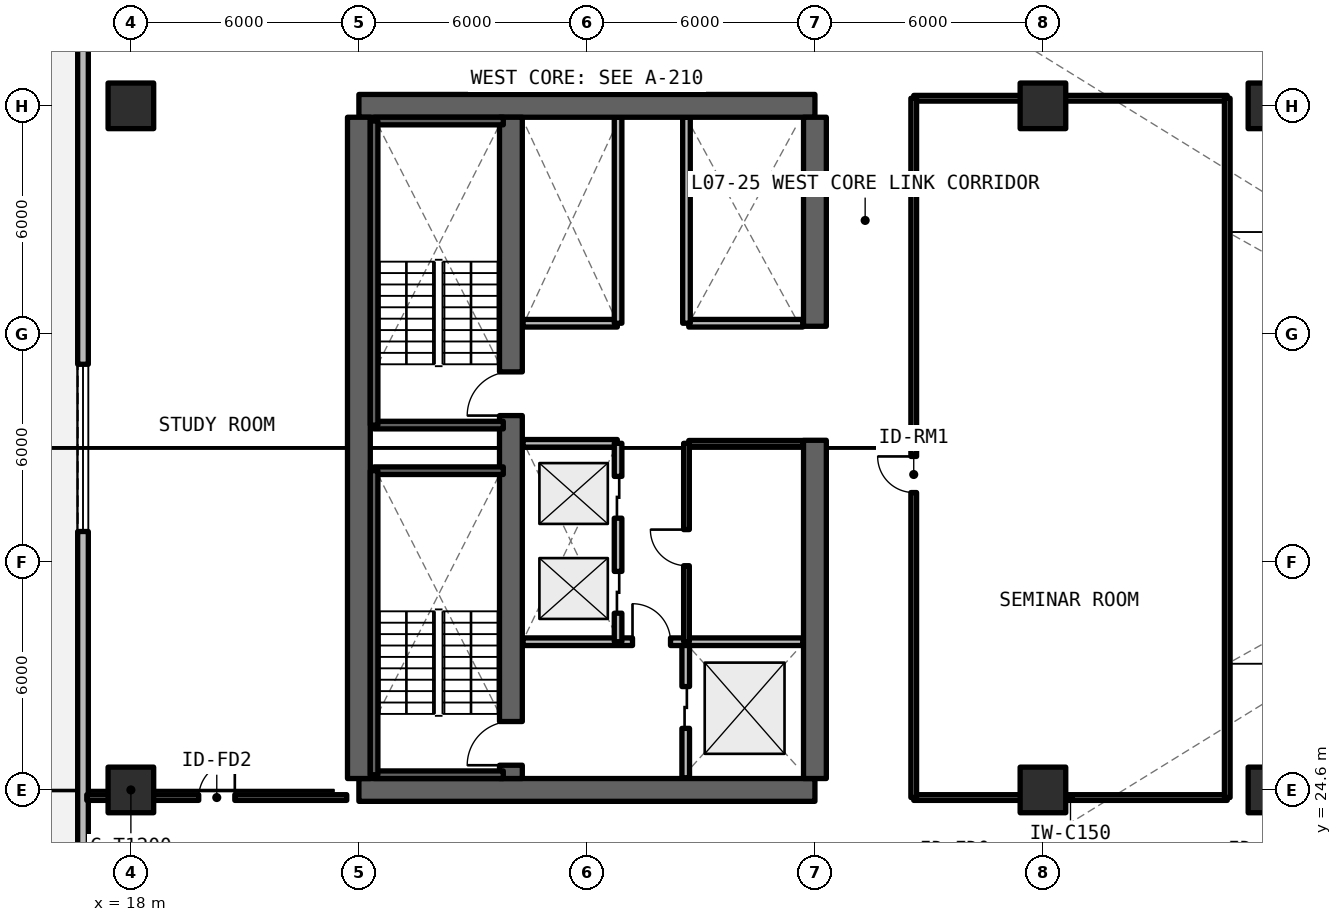
"""IFC4 building model, lengths in metres.
Left out: names, types, materials, properties, quantities, classifications, styles, units other than length and angle.
Written with IfcOpenShell. Run it as: python <this file> out.ifc"""

import sys

from ifc_helpers import new_model, si_unit, direction, frame, frame_2d, origin, origin_2d, place, context, subcontext, project, spatial, rectangle, extrude, element, fill, save


model = new_model("IFC4")
c1 = context("Model", 3, precision=1e-05, world=origin(), true_north=direction((0.0, 1.0)))
c2 = subcontext(c1, "Body", "Model", "MODEL_VIEW")
j1 = project(units=[si_unit("LENGTHUNIT", "METRE"), si_unit("PLANEANGLEUNIT", "RADIAN")], contexts=[c1])
p1 = place(None, origin())
s1 = spatial("IfcSite", under=j1, at=p1, CompositionType="ELEMENT")
p2 = place(p1, origin())
s2 = spatial("IfcBuilding", under=s1, at=p2, CompositionType="ELEMENT")
p3 = place(p2, frame((0.0, 0.0, 29.04)))
s3 = spatial("IfcBuildingStorey", under=s2, at=p3, CompositionType="ELEMENT", Elevation=29.04)
for number, where, z_axis, x_axis in (
    (1, (24.0, 24.6, 0.0), (0.0, 0.0, 1.0), (1.0, 0.0, 0.0)),
    (2, (36.0, 42.6, 0.0), (0.0, 0.0, 1.0), (-1.0, 0.0, 0.0)),
):
    element("IfcWall", number, at=place(p3, frame(where, z_axis=z_axis, x_axis=x_axis)), inside=s3, PredefinedType="SHEAR", context=c2, shape_type="SweptSolid", body=[
        extrude(rectangle(XDim=12.0, YDim=0.6, at=frame_2d((6.0, 0.0))), origin(), (0.0, 0.0, 1.0), 3.3),
    ])
p4 = place(p3, frame((24.0, 24.9, 0.0), z_axis=(0.0, 0.0, 1.0), x_axis=(0.0, 1.0, 0.0)))
e3 = element("IfcWall", 3, at=p4, inside=s3, PredefinedType="SHEAR", context=c2, shape_type="SweptSolid", body=[
    extrude(rectangle(XDim=17.4, YDim=0.6, at=frame_2d((8.7, 0.0))), origin(), (0.0, 0.0, 1.0), 3.3),
])
p5 = place(p3, frame((36.0, 24.9, 0.0), z_axis=(0.0, 0.0, 1.0), x_axis=(0.0, 1.0, 0.0)))
e4 = element("IfcWall", 4, at=p5, inside=s3, PredefinedType="SHEAR", context=c2, shape_type="SweptSolid", body=[
    extrude(rectangle(XDim=8.9, YDim=0.6, at=frame_2d((4.45, 0.0))), origin(), (0.0, 0.0, 1.0), 3.3),
])
p6 = place(p3, frame((36.0, 36.8, 0.0), z_axis=(0.0, 0.0, 1.0), x_axis=(0.0, 1.0, 0.0)))
e5 = element("IfcWall", 5, at=p6, inside=s3, PredefinedType="SHEAR", context=c2, shape_type="SweptSolid", body=[
    extrude(rectangle(XDim=5.5, YDim=0.6, at=frame_2d((2.75, 0.0))), origin(), (0.0, 0.0, 1.0), 3.3),
])
p7 = place(p3, frame((28.0, 24.9, 0.0), z_axis=(0.0, 0.0, 1.0), x_axis=(0.0, 1.0, 0.0)))
e6 = element("IfcWall", 6, at=p7, inside=s3, PredefinedType="SHEAR", context=c2, shape_type="SweptSolid", body=[
    extrude(rectangle(XDim=17.4, YDim=0.6, at=frame_2d((8.7, 0.0))), origin(), (0.0, 0.0, 1.0), 3.3),
])
p8 = place(p7, frame((0.35, 0.0, 0.0)))
e7 = element("IfcOpeningElement", 7, at=p8, cuts=e6, PredefinedType="OPENING", context=c2, shape_type="SweptSolid", body=[
    extrude(rectangle(XDim=1.15, YDim=2.15, at=frame_2d((0.575, 1.075))), frame((0.0, 0.31, 0.0), z_axis=(0.0, -1.0, 0.0), x_axis=(1.0, 0.0, 0.0)), (0.0, 0.0, 1.0), 0.62),
])
p9 = place(p7, frame((9.55, 0.0, 0.0)))
e8 = element("IfcOpeningElement", 8, at=p9, cuts=e6, PredefinedType="OPENING", context=c2, shape_type="SweptSolid", body=[
    extrude(rectangle(XDim=1.15, YDim=2.15, at=frame_2d((0.575, 1.075))), frame((0.0, 0.31, 0.0), z_axis=(0.0, -1.0, 0.0), x_axis=(1.0, 0.0, 0.0)), (0.0, 0.0, 1.0), 0.62),
])
for number, where, z_axis, x_axis in (
    (9, (18.0, 24.6, -0.24), (0.0, 0.0, 1.0), (1.0, 0.0, 0.0)),
    (10, (18.0, 42.6, -0.24), (0.0, 0.0, 1.0), (1.0, 0.0, 0.0)),
    (11, (42.0, 24.6, -0.24), (0.0, 0.0, 1.0), (1.0, 0.0, 0.0)),
    (12, (42.0, 42.6, -0.24), (0.0, 0.0, 1.0), (1.0, 0.0, 0.0)),
    (13, (48.0, 24.6, -0.24), (0.0, 0.0, 1.0), (1.0, 0.0, 0.0)),
    (14, (48.0, 42.6, -0.24), (0.0, 0.0, 1.0), (1.0, 0.0, 0.0)),
):
    element("IfcColumn", number, at=place(p3, frame(where, z_axis=z_axis, x_axis=x_axis)), inside=s3, PredefinedType="COLUMN", context=c2, shape_type="SweptSolid", body=[
        extrude(rectangle(XDim=1.2, YDim=1.2, at=origin_2d()), origin(), (0.0, 0.0, 1.0), 3.54),
    ])
p10 = place(p3, frame((16.74, 55.342, 0.0), z_axis=(0.0, 0.0, 1.0), x_axis=(0.0, -1.0, 0.0)))
e15 = element("IfcWall", 15, at=p10, inside=s3, PredefinedType="SOLIDWALL", context=c2, shape_type="SweptSolid", body=[
    extrude(rectangle(XDim=43.484, YDim=0.28, at=frame_2d((21.742, 0.0))), origin(), (0.0, 0.0, 1.0), 3.08),
])
p11 = place(p10, frame((19.542, 0.0, 0.78)))
e16 = element("IfcOpeningElement", 16, at=p11, cuts=e15, PredefinedType="OPENING", context=c2, shape_type="SweptSolid", body=[
    extrude(rectangle(XDim=4.4, YDim=1.66, at=frame_2d((2.2, 0.83))), frame((0.0, 0.15, 0.0), z_axis=(0.0, -1.0, 0.0), x_axis=(1.0, 0.0, 0.0)), (0.0, 0.0, 1.0), 0.3),
])
p12 = place(p10, frame((37.573, 0.0, 0.78)))
e17 = element("IfcOpeningElement", 17, at=p12, cuts=e15, PredefinedType="OPENING", context=c2, shape_type="SweptSolid", body=[
    extrude(rectangle(XDim=4.4, YDim=1.66, at=frame_2d((2.2, 0.83))), frame((0.0, 0.15, 0.0), z_axis=(0.0, -1.0, 0.0), x_axis=(1.0, 0.0, 0.0)), (0.0, 0.0, 1.0), 0.3),
])
p13 = place(p3, frame((32.6, 24.92, 0.0), z_axis=(0.0, 0.0, 1.0), x_axis=(0.0, 1.0, 0.0)))
e18 = element("IfcWall", 18, at=p13, inside=s3, PredefinedType="SOLIDWALL", context=c2, shape_type="SweptSolid", body=[
    extrude(rectangle(XDim=3.58, YDim=0.2, at=frame_2d((1.79, 0.0))), origin(), (0.0, 0.0, 1.0), 2.35),
])
p14 = place(p13, frame((1.3, 0.0, 0.0)))
e19 = element("IfcOpeningElement", 19, at=p14, cuts=e18, PredefinedType="OPENING", context=c2, shape_type="SweptSolid", body=[
    extrude(rectangle(XDim=1.1, YDim=2.2, at=frame_2d((0.55, 1.1))), frame((0.0, 0.11, 0.0), z_axis=(0.0, -1.0, 0.0), x_axis=(1.0, 0.0, 0.0)), (0.0, 0.0, 1.0), 0.22),
])
p15 = place(p3, frame((28.32, 28.5, 0.0), z_axis=(0.0, 0.0, 1.0), x_axis=(1.0, 0.0, 0.0)))
e20 = element("IfcWall", 20, at=p15, inside=s3, PredefinedType="SOLIDWALL", context=c2, shape_type="SweptSolid", body=[
    extrude(rectangle(XDim=7.36, YDim=0.2, at=frame_2d((3.68, 0.0))), origin(), (0.0, 0.0, 1.0), 2.35),
])
p16 = place(p15, frame((2.88, 0.0, 0.0)))
e21 = element("IfcOpeningElement", 21, at=p16, cuts=e20, PredefinedType="OPENING", context=c2, shape_type="SweptSolid", body=[
    extrude(rectangle(XDim=1.0, YDim=2.15, at=frame_2d((0.5, 1.075))), frame((0.0, 0.11, 0.0), z_axis=(0.0, -1.0, 0.0), x_axis=(1.0, 0.0, 0.0)), (0.0, 0.0, 1.0), 0.22),
])
p17 = place(p3, frame((28.32, 33.72, 0.0), z_axis=(0.0, 0.0, 1.0), x_axis=(1.0, 0.0, 0.0)))
e22 = element("IfcWall", 22, at=p17, inside=s3, PredefinedType="SOLIDWALL", context=c2, shape_type="SweptSolid", body=[
    extrude(rectangle(XDim=2.48, YDim=0.2, at=frame_2d((1.24, 0.0))), origin(), (0.0, 0.0, 1.0), 2.35),
])
p18 = place(p3, frame((30.82, 28.5, 0.0), z_axis=(0.0, 0.0, 1.0), x_axis=(0.0, 1.0, 0.0)))
e23 = element("IfcWall", 23, at=p18, inside=s3, PredefinedType="SOLIDWALL", context=c2, shape_type="SweptSolid", body=[
    extrude(rectangle(XDim=5.22, YDim=0.2, at=frame_2d((2.61, 0.0))), origin(), (0.0, 0.0, 1.0), 2.35),
])
p19 = place(p18, frame((0.75, 0.0, 0.0)))
e24 = element("IfcOpeningElement", 24, at=p19, cuts=e23, PredefinedType="OPENING", context=c2, shape_type="SweptSolid", body=[
    extrude(rectangle(XDim=1.1, YDim=2.2, at=frame_2d((0.55, 1.1))), frame((0.0, 0.11, 0.0), z_axis=(0.0, -1.0, 0.0), x_axis=(1.0, 0.0, 0.0)), (0.0, 0.0, 1.0), 0.22),
])
p20 = place(p18, frame((3.25, 0.0, 0.0)))
e25 = element("IfcOpeningElement", 25, at=p20, cuts=e23, PredefinedType="OPENING", context=c2, shape_type="SweptSolid", body=[
    extrude(rectangle(XDim=1.1, YDim=2.2, at=frame_2d((0.55, 1.1))), frame((0.0, 0.11, 0.0), z_axis=(0.0, -1.0, 0.0), x_axis=(1.0, 0.0, 0.0)), (0.0, 0.0, 1.0), 0.22),
])
p21 = place(p3, frame((32.68, 33.72, 0.0), z_axis=(0.0, 0.0, 1.0), x_axis=(1.0, 0.0, 0.0)))
e26 = element("IfcWall", 26, at=p21, inside=s3, PredefinedType="SOLIDWALL", context=c2, shape_type="SweptSolid", body=[
    extrude(rectangle(XDim=3.0, YDim=0.15, at=frame_2d((1.5, 0.0))), origin(), (0.0, 0.0, 1.0), 2.35),
])
p22 = place(p3, frame((32.62, 28.5, 0.0), z_axis=(0.0, 0.0, 1.0), x_axis=(0.0, 1.0, 0.0)))
e27 = element("IfcWall", 27, at=p22, inside=s3, PredefinedType="SOLIDWALL", context=c2, shape_type="SweptSolid", body=[
    extrude(rectangle(XDim=5.22, YDim=0.15, at=frame_2d((2.61, 0.0))), origin(), (0.0, 0.0, 1.0), 2.35),
])
p23 = place(p22, frame((2.0, 0.0, 0.0)))
e28 = element("IfcOpeningElement", 28, at=p23, cuts=e27, PredefinedType="OPENING", context=c2, shape_type="SweptSolid", body=[
    extrude(rectangle(XDim=0.95, YDim=2.15, at=frame_2d((0.475, 1.075))), frame((0.0, 0.085, 0.0), z_axis=(0.0, -1.0, 0.0), x_axis=(1.0, 0.0, 0.0)), (0.0, 0.0, 1.0), 0.17),
])
p24 = place(p3, frame((28.32, 36.88, 0.0), z_axis=(0.0, 0.0, 1.0), x_axis=(1.0, 0.0, 0.0)))
e29 = element("IfcWall", 29, at=p24, inside=s3, PredefinedType="SOLIDWALL", context=c2, shape_type="SweptSolid", body=[
    extrude(rectangle(XDim=2.48, YDim=0.2, at=frame_2d((1.24, 0.0))), origin(), (0.0, 0.0, 1.0), 2.35),
])
p25 = place(p3, frame((30.82, 36.88, 0.0), z_axis=(0.0, 0.0, 1.0), x_axis=(0.0, 1.0, 0.0)))
e30 = element("IfcWall", 30, at=p25, inside=s3, PredefinedType="SOLIDWALL", context=c2, shape_type="SweptSolid", body=[
    extrude(rectangle(XDim=5.42, YDim=0.2, at=frame_2d((2.71, 0.0))), origin(), (0.0, 0.0, 1.0), 2.35),
])
p26 = place(p3, frame((32.68, 36.88, 0.0), z_axis=(0.0, 0.0, 1.0), x_axis=(1.0, 0.0, 0.0)))
e31 = element("IfcWall", 31, at=p26, inside=s3, PredefinedType="SOLIDWALL", context=c2, shape_type="SweptSolid", body=[
    extrude(rectangle(XDim=3.0, YDim=0.2, at=frame_2d((1.5, 0.0))), origin(), (0.0, 0.0, 1.0), 2.35),
])
p27 = place(p3, frame((32.62, 36.88, 0.0), z_axis=(0.0, 0.0, 1.0), x_axis=(0.0, 1.0, 0.0)))
e32 = element("IfcWall", 32, at=p27, inside=s3, PredefinedType="SOLIDWALL", context=c2, shape_type="SweptSolid", body=[
    extrude(rectangle(XDim=5.42, YDim=0.2, at=frame_2d((2.71, 0.0))), origin(), (0.0, 0.0, 1.0), 2.35),
])
for number, where, z_axis, x_axis in (
    (33, (38.6, 24.4, 0.0), (0.0, 0.0, 1.0), (1.0, 0.0, 0.0)),
    (34, (38.6, 42.8, 0.0), (0.0, 0.0, 1.0), (1.0, 0.0, 0.0)),
):
    element("IfcWall", number, at=place(p3, frame(where, z_axis=z_axis, x_axis=x_axis)), inside=s3, PredefinedType="SOLIDWALL", context=c2, shape_type="SweptSolid", body=[
        extrude(rectangle(XDim=8.25, YDim=0.15, at=frame_2d((4.125, 0.0))), origin(), (0.0, 0.0, 1.0), 2.295),
    ])
p28 = place(p3, frame((38.6, 24.4, 0.0), z_axis=(0.0, 0.0, 1.0), x_axis=(0.0, 1.0, 0.0)))
e35 = element("IfcWall", 35, at=p28, inside=s3, PredefinedType="SOLIDWALL", context=c2, shape_type="SweptSolid", body=[
    extrude(rectangle(XDim=18.4, YDim=0.15, at=frame_2d((9.2, 0.0))), origin(), (0.0, 0.0, 1.0), 2.35),
])
p29 = place(p28, frame((8.025, 0.0, 0.0)))
e36 = element("IfcOpeningElement", 36, at=p29, cuts=e35, PredefinedType="OPENING", context=c2, shape_type="SweptSolid", body=[
    extrude(rectangle(XDim=0.95, YDim=2.15, at=frame_2d((0.475, 1.075))), frame((0.0, 0.085, 0.0), z_axis=(0.0, -1.0, 0.0), x_axis=(1.0, 0.0, 0.0)), (0.0, 0.0, 1.0), 0.17),
])
p30 = place(p3, frame((46.85, 24.4, 0.0), z_axis=(0.0, 0.0, 1.0), x_axis=(0.0, 1.0, 0.0)))
e37 = element("IfcWall", 37, at=p30, inside=s3, PredefinedType="SOLIDWALL", context=c2, shape_type="SweptSolid", body=[
    extrude(rectangle(XDim=18.4, YDim=0.15, at=frame_2d((9.2, 0.0))), origin(), (0.0, 0.0, 1.0), 2.35),
])
p31 = place(p3, frame((16.84, 24.4, 0.0), z_axis=(0.0, 0.0, 1.0), x_axis=(1.0, 0.0, 0.0)))
e38 = element("IfcWall", 38, at=p31, inside=s3, PredefinedType="SOLIDWALL", context=c2, shape_type="SweptSolid", body=[
    extrude(rectangle(XDim=6.84, YDim=0.15, at=frame_2d((3.42, 0.0))), origin(), (0.0, 0.0, 1.0), 2.295),
])
p32 = place(p31, frame((2.945, 0.0, 0.0)))
e39 = element("IfcOpeningElement", 39, at=p32, cuts=e38, PredefinedType="OPENING", context=c2, shape_type="SweptSolid", body=[
    extrude(rectangle(XDim=0.95, YDim=2.15, at=frame_2d((0.475, 1.075))), frame((0.0, 0.085, 0.0), z_axis=(0.0, -1.0, 0.0), x_axis=(1.0, 0.0, 0.0)), (0.0, 0.0, 1.0), 0.17),
])
for number, where, z_axis, x_axis in (
    (40, (24.4, 25.0, 0.0), (0.0, 0.0, 1.0), (1.0, 0.0, 0.0)),
    (41, (27.8, 33.0, 0.0), (0.0, 0.0, 1.0), (-1.0, 0.0, 0.0)),
):
    element("IfcWall", number, at=place(p3, frame(where, z_axis=z_axis, x_axis=x_axis)), inside=s3, PredefinedType="SOLIDWALL", context=c2, shape_type="SweptSolid", body=[
        extrude(rectangle(XDim=3.4, YDim=0.2, at=frame_2d((1.7, 0.0))), origin(), (0.0, 0.0, 1.0), 3.3),
    ])
p33 = place(p3, frame((24.4, 33.0, 0.0), z_axis=(0.0, 0.0, 1.0), x_axis=(0.0, -1.0, 0.0)))
e42 = element("IfcWall", 42, at=p33, inside=s3, PredefinedType="SOLIDWALL", context=c2, shape_type="SweptSolid", body=[
    extrude(rectangle(XDim=8.0, YDim=0.2, at=frame_2d((4.0, 0.0))), origin(), (0.0, 0.0, 1.0), 3.3),
])
for number, where, z_axis, x_axis in (
    (43, (24.4, 34.2, 0.0), (0.0, 0.0, 1.0), (1.0, 0.0, 0.0)),
    (44, (27.8, 42.2, 0.0), (0.0, 0.0, 1.0), (-1.0, 0.0, 0.0)),
):
    element("IfcWall", number, at=place(p3, frame(where, z_axis=z_axis, x_axis=x_axis)), inside=s3, PredefinedType="SOLIDWALL", context=c2, shape_type="SweptSolid", body=[
        extrude(rectangle(XDim=3.4, YDim=0.2, at=frame_2d((1.7, 0.0))), origin(), (0.0, 0.0, 1.0), 3.3),
    ])
p34 = place(p3, frame((24.4, 42.2, 0.0), z_axis=(0.0, 0.0, 1.0), x_axis=(0.0, -1.0, 0.0)))
e45 = element("IfcWall", 45, at=p34, inside=s3, PredefinedType="SOLIDWALL", context=c2, shape_type="SweptSolid", body=[
    extrude(rectangle(XDim=8.0, YDim=0.2, at=frame_2d((4.0, 0.0))), origin(), (0.0, 0.0, 1.0), 3.3),
])
p35 = place(p11, origin())
e46 = element("IfcWindow", 46, at=p35, inside=s3, PartitioningType="SINGLE_PANEL", PredefinedType="WINDOW", context=c2, shape_type="SweptSolid", body=[
    extrude(rectangle(XDim=4.4, YDim=1.66, at=frame_2d((2.2, 0.83))), frame((0.0, 0.03, 0.0), z_axis=(0.0, -1.0, 0.0), x_axis=(1.0, 0.0, 0.0)), (0.0, 0.0, 1.0), 0.06),
])
fill(e16, e46)
p36 = place(p14, origin())
e47 = element("IfcDoor", 47, at=p36, inside=s3, OperationType="SLIDING_TO_LEFT", PredefinedType="DOOR", context=c2, shape_type="SweptSolid", body=[
    extrude(rectangle(XDim=1.1, YDim=2.2, at=frame_2d((0.55, 1.1))), frame((0.0, 0.025, 0.0), z_axis=(0.0, -1.0, 0.0), x_axis=(1.0, 0.0, 0.0)), (0.0, 0.0, 1.0), 0.05),
])
fill(e19, e47)
p37 = place(p16, origin())
e48 = element("IfcDoor", 48, at=p37, inside=s3, OperationType="SINGLE_SWING_LEFT", PredefinedType="DOOR", context=c2, shape_type="SweptSolid", body=[
    extrude(rectangle(XDim=1.0, YDim=2.15, at=frame_2d((0.5, 1.075))), frame((0.0, 0.025, 0.0), z_axis=(0.0, -1.0, 0.0), x_axis=(1.0, 0.0, 0.0)), (0.0, 0.0, 1.0), 0.05),
])
fill(e21, e48)
p38 = place(p19, origin())
e49 = element("IfcDoor", 49, at=p38, inside=s3, OperationType="SLIDING_TO_LEFT", PredefinedType="DOOR", context=c2, shape_type="SweptSolid", body=[
    extrude(rectangle(XDim=1.1, YDim=2.2, at=frame_2d((0.55, 1.1))), frame((0.0, 0.025, 0.0), z_axis=(0.0, -1.0, 0.0), x_axis=(1.0, 0.0, 0.0)), (0.0, 0.0, 1.0), 0.05),
])
fill(e24, e49)
p39 = place(p20, origin())
e50 = element("IfcDoor", 50, at=p39, inside=s3, OperationType="SLIDING_TO_RIGHT", PredefinedType="DOOR", context=c2, shape_type="SweptSolid", body=[
    extrude(rectangle(XDim=1.1, YDim=2.2, at=frame_2d((0.55, 1.1))), frame((0.0, 0.025, 0.0), z_axis=(0.0, -1.0, 0.0), x_axis=(1.0, 0.0, 0.0)), (0.0, 0.0, 1.0), 0.05),
])
fill(e25, e50)
p40 = place(p23, origin())
e51 = element("IfcDoor", 51, at=p40, inside=s3, OperationType="SINGLE_SWING_RIGHT", PredefinedType="DOOR", context=c2, shape_type="SweptSolid", body=[
    extrude(rectangle(XDim=0.95, YDim=2.15, at=frame_2d((0.475, 1.075))), frame((0.0, 0.025, 0.0), z_axis=(0.0, -1.0, 0.0), x_axis=(1.0, 0.0, 0.0)), (0.0, 0.0, 1.0), 0.05),
])
fill(e28, e51)
p41 = place(p29, origin())
e52 = element("IfcDoor", 52, at=p41, inside=s3, OperationType="SINGLE_SWING_RIGHT", PredefinedType="DOOR", context=c2, shape_type="SweptSolid", body=[
    extrude(rectangle(XDim=0.95, YDim=2.15, at=frame_2d((0.475, 1.075))), frame((0.0, 0.025, 0.0), z_axis=(0.0, -1.0, 0.0), x_axis=(1.0, 0.0, 0.0)), (0.0, 0.0, 1.0), 0.05),
])
fill(e36, e52)
p42 = place(p32, origin())
e53 = element("IfcDoor", 53, at=p42, inside=s3, OperationType="SINGLE_SWING_RIGHT", PredefinedType="DOOR", context=c2, shape_type="SweptSolid", body=[
    extrude(rectangle(XDim=0.95, YDim=2.15, at=frame_2d((0.475, 1.075))), frame((0.0, 0.025, 0.0), z_axis=(0.0, -1.0, 0.0), x_axis=(1.0, 0.0, 0.0)), (0.0, 0.0, 1.0), 0.05),
])
fill(e39, e53)
p43 = place(p8, origin())
e54 = element("IfcDoor", 54, at=p43, inside=s3, OperationType="SINGLE_SWING_LEFT", PredefinedType="DOOR", context=c2, shape_type="SweptSolid", body=[
    extrude(rectangle(XDim=1.15, YDim=2.15, at=frame_2d((0.575, 1.075))), frame((0.0, 0.025, 0.0), z_axis=(0.0, -1.0, 0.0), x_axis=(1.0, 0.0, 0.0)), (0.0, 0.0, 1.0), 0.05),
])
fill(e7, e54)
p44 = place(p9, origin())
e55 = element("IfcDoor", 55, at=p44, inside=s3, OperationType="SINGLE_SWING_RIGHT", PredefinedType="DOOR", context=c2, shape_type="SweptSolid", body=[
    extrude(rectangle(XDim=1.15, YDim=2.15, at=frame_2d((0.575, 1.075))), frame((0.0, 0.025, 0.0), z_axis=(0.0, -1.0, 0.0), x_axis=(1.0, 0.0, 0.0)), (0.0, 0.0, 1.0), 0.05),
])
fill(e8, e55)
save(model, sys.argv[1])
